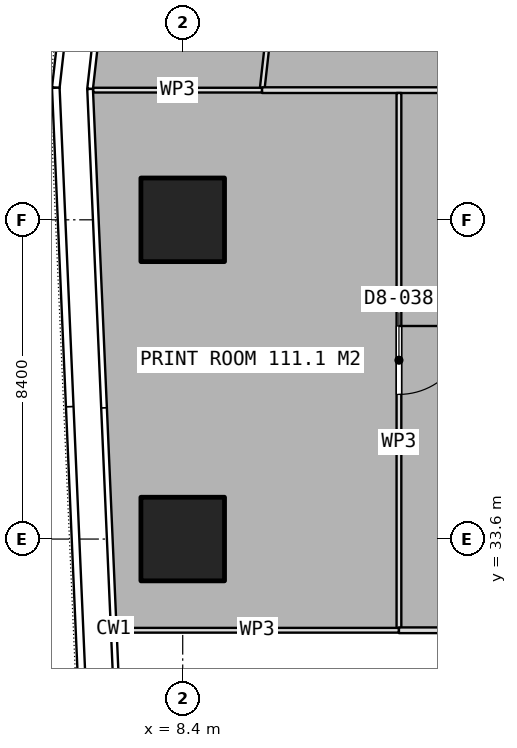
"""IFC4 building model, lengths in metres.
Left out: names, types, materials, properties, quantities, classifications, styles, units other than length and angle.
Written with IfcOpenShell. Run it as: python <this file> out.ifc"""

import sys

from ifc_helpers import new_model, si_unit, direction, frame, frame_2d, origin, origin_2d, place, context, subcontext, project, spatial, rectangle, extrude, element, fill, save


model = new_model("IFC4")
c1 = context("Model", 3, precision=1e-05, world=origin(), true_north=direction((0.0, 1.0)))
c2 = subcontext(c1, "Body", "Model", "MODEL_VIEW")
j1 = project(units=[si_unit("LENGTHUNIT", "METRE"), si_unit("PLANEANGLEUNIT", "RADIAN")], contexts=[c1])
p1 = place(None, origin())
s1 = spatial("IfcSite", under=j1, at=p1, CompositionType="ELEMENT")
p2 = place(p1, origin())
s2 = spatial("IfcBuilding", under=s1, at=p2, CompositionType="ELEMENT")
p3 = place(p2, frame((0.0, 0.0, 36.65)))
s3 = spatial("IfcBuildingStorey", under=s2, at=p3, CompositionType="ELEMENT", Elevation=36.65)
for number, where, z_axis, x_axis in (
    (1, (8.4, 33.6, 0.0), (0.0, 0.0, 1.0), (1.0, 0.0, 0.0)),
    (2, (8.4, 42.0, 0.0), (0.0, 0.0, 1.0), (1.0, 0.0, 0.0)),
):
    element("IfcColumn", number, at=place(p3, frame(where, z_axis=z_axis, x_axis=x_axis)), inside=s3, PredefinedType="COLUMN", context=c2, shape_type="SweptSolid", body=[
        extrude(rectangle(XDim=2.2, YDim=2.2, at=origin_2d()), origin(), (0.0, 0.0, 1.0), 3.75),
    ])
p4 = place(p3, frame((11.185, 51.62, 0.0), z_axis=(0.0, 0.0, 1.0), x_axis=(-0.111576721485, -0.993755822737, 0.0)))
e3 = element("IfcWall", 3, at=p4, inside=s3, PredefinedType="PARTITIONING", context=c2, shape_type="SweptSolid", body=[
    extrude(rectangle(XDim=6.247, YDim=0.125, at=frame_2d((3.124, 0.0))), origin(), (0.0, 0.0, 1.0), 3.5),
])
p5 = place(p4, frame((2.624, 0.0, 0.0)))
e4 = element("IfcOpeningElement", 4, at=p5, cuts=e3, PredefinedType="OPENING", context=c2, shape_type="SweptSolid", body=[
    extrude(rectangle(XDim=1.0, YDim=2.1, at=frame_2d((0.5, 1.05))), frame((0.0, 0.073, 0.0), z_axis=(0.0, -1.0, 0.0), x_axis=(1.0, 0.0, 0.0)), (0.0, 0.0, 1.0), 0.145),
])
p6 = place(p3, frame((10.488, 45.412, 0.0), z_axis=(0.0, 0.0, 1.0), x_axis=(-1.0, 0.0, 0.0)))
e5 = element("IfcWall", 5, at=p6, inside=s3, PredefinedType="PARTITIONING", context=c2, shape_type="SweptSolid", body=[
    extrude(rectangle(XDim=4.444, YDim=0.125, at=frame_2d((2.222, 0.0))), origin(), (0.0, 0.0, 1.0), 3.5),
])
p7 = place(p3, frame((22.4, 45.412, 0.0), z_axis=(0.0, 0.0, 1.0), x_axis=(-1.0, 0.0, 0.0)))
e6 = element("IfcWall", 6, at=p7, inside=s3, PredefinedType="PARTITIONING", context=c2, shape_type="SweptSolid", body=[
    extrude(rectangle(XDim=11.912, YDim=0.15, at=frame_2d((5.956, 0.0))), origin(), (0.0, 0.0, 1.0), 3.5),
])
p8 = place(p3, frame((14.09, 45.337, 0.0), z_axis=(0.0, 0.0, 1.0), x_axis=(0.0, -1.0, 0.0)))
e7 = element("IfcWall", 7, at=p8, inside=s3, PredefinedType="PARTITIONING", context=c2, shape_type="SweptSolid", body=[
    extrude(rectangle(XDim=14.137, YDim=0.125, at=frame_2d((7.068, 0.0))), origin(), (0.0, 0.0, 1.0), 3.5),
])
p9 = place(p8, frame((6.131, 0.0, 0.0)))
e8 = element("IfcOpeningElement", 8, at=p9, cuts=e7, PredefinedType="OPENING", context=c2, shape_type="SweptSolid", body=[
    extrude(rectangle(XDim=1.8, YDim=2.1, at=frame_2d((0.9, 1.05))), frame((0.0, 0.073, 0.0), z_axis=(0.0, -1.0, 0.0), x_axis=(1.0, 0.0, 0.0)), (0.0, 0.0, 1.0), 0.145),
])
p10 = place(p3, frame((14.09, 31.2, 0.0), z_axis=(0.0, 0.0, 1.0), x_axis=(-1.0, 0.0, 0.0)))
e9 = element("IfcWall", 9, at=p10, inside=s3, PredefinedType="PARTITIONING", context=c2, shape_type="SweptSolid", body=[
    extrude(rectangle(XDim=7.455, YDim=0.125, at=frame_2d((3.728, 0.0))), origin(), (0.0, 0.0, 1.0), 3.5),
])
p11 = place(p3, frame((22.4, 31.2, 0.0), z_axis=(0.0, 0.0, 1.0), x_axis=(-1.0, 0.0, 0.0)))
e10 = element("IfcWall", 10, at=p11, inside=s3, PredefinedType="PARTITIONING", context=c2, shape_type="SweptSolid", body=[
    extrude(rectangle(XDim=8.31, YDim=0.15, at=frame_2d((4.155, 0.0))), origin(), (0.0, 0.0, 1.0), 3.5),
])
p12 = place(p9, origin())
e11 = element("IfcDoor", 11, at=p12, inside=s3, OperationType="DOUBLE_DOOR_SINGLE_SWING", PredefinedType="DOOR", context=c2, shape_type="SweptSolid", body=[
    extrude(rectangle(XDim=1.8, YDim=2.1, at=frame_2d((0.9, 1.05))), frame((0.0, 0.025, 0.0), z_axis=(0.0, -1.0, 0.0), x_axis=(1.0, 0.0, 0.0)), (0.0, 0.0, 1.0), 0.05),
])
fill(e8, e11)
save(model, sys.argv[1])
